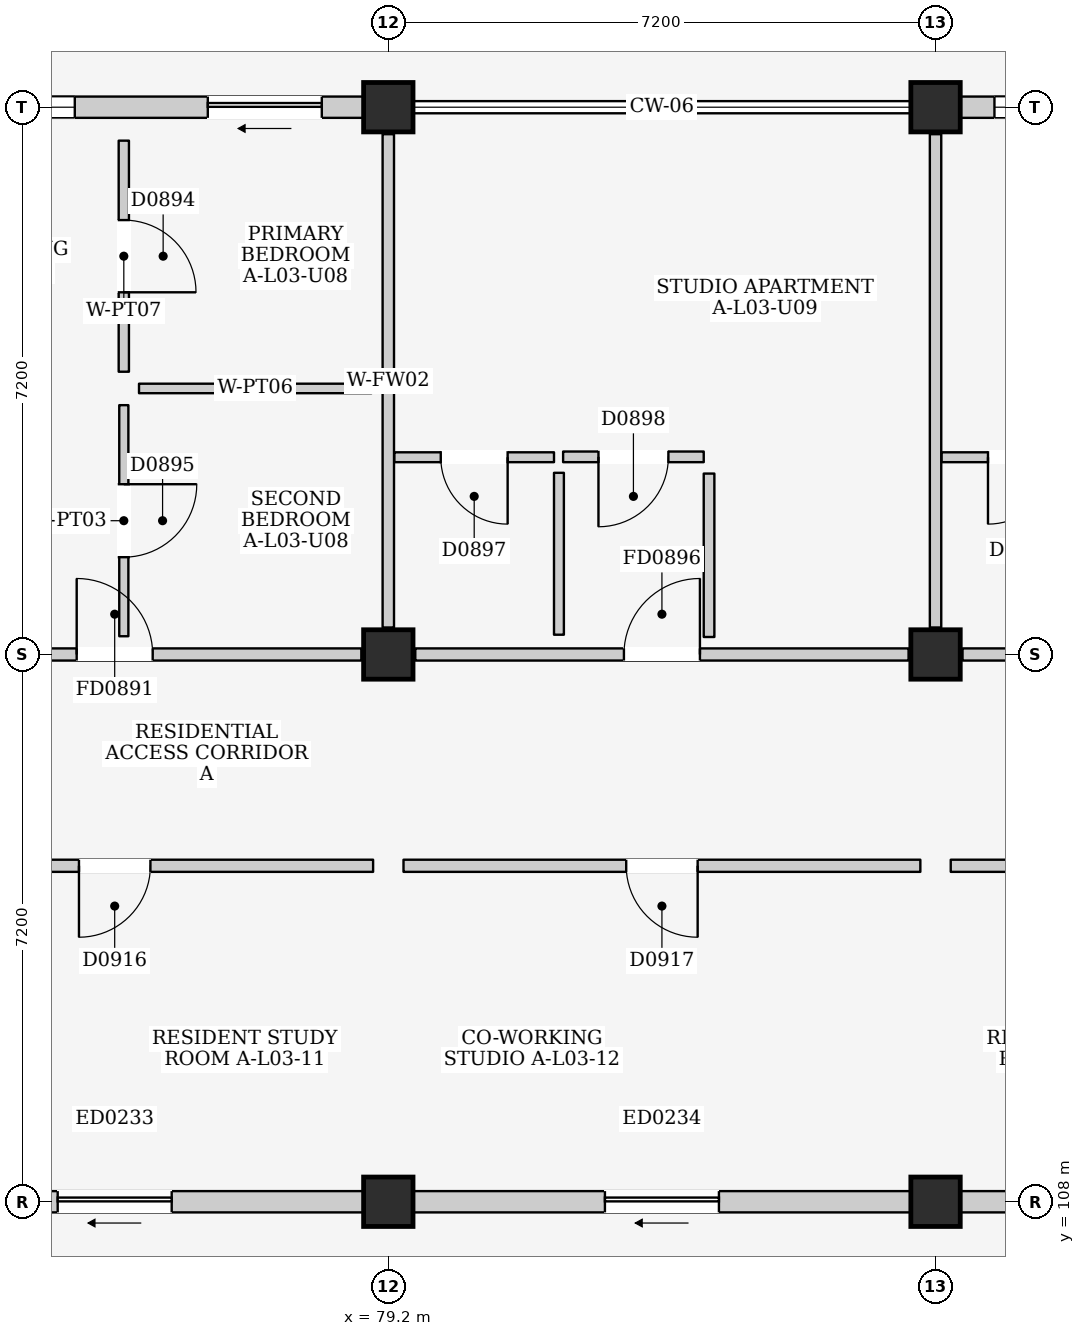
"""IFC4 building model, lengths in metres.
Left out: names, types, materials, properties, quantities, classifications, styles, units other than length and angle.
Written with IfcOpenShell. Run it as: python <this file> out.ifc"""

import sys

from ifc_helpers import new_model, si_unit, direction, frame, frame_2d, origin, origin_2d, place, context, subcontext, project, spatial, rectangle, extrude, element, fill, save


model = new_model("IFC4")
c1 = context("Model", 3, precision=1e-05, world=origin(), true_north=direction((0.0, 1.0)))
c2 = subcontext(c1, "Body", "Model", "MODEL_VIEW")
j1 = project(units=[si_unit("LENGTHUNIT", "METRE"), si_unit("PLANEANGLEUNIT", "RADIAN")], contexts=[c1])
p1 = place(None, origin())
s1 = spatial("IfcSite", under=j1, at=p1, CompositionType="ELEMENT")
p2 = place(p1, origin())
s2 = spatial("IfcBuilding", under=s1, at=p2, CompositionType="ELEMENT")
p3 = place(p2, frame((0.0, 0.0, 12.2)))
s3 = spatial("IfcBuildingStorey", under=s2, at=p3, CompositionType="ELEMENT", Elevation=12.2)
for number, where, z_axis, x_axis in (
    (1, (79.2, 108.0, 0.0), (0.0, 0.0, 1.0), (1.0, 0.0, 0.0)),
    (2, (79.2, 115.2, 0.0), (0.0, 0.0, 1.0), (1.0, 0.0, 0.0)),
    (3, (79.2, 122.4, 0.0), (0.0, 0.0, 1.0), (1.0, 0.0, 0.0)),
    (4, (86.4, 108.0, 0.0), (0.0, 0.0, 1.0), (1.0, 0.0, 0.0)),
    (5, (86.4, 115.2, 0.0), (0.0, 0.0, 1.0), (1.0, 0.0, 0.0)),
    (6, (86.4, 122.4, 0.0), (0.0, 0.0, 1.0), (1.0, 0.0, 0.0)),
):
    element("IfcColumn", number, at=place(p3, frame(where, z_axis=z_axis, x_axis=x_axis)), inside=s3, PredefinedType="COLUMN", context=c2, shape_type="SweptSolid", body=[
        extrude(rectangle(XDim=0.65, YDim=0.65, at=origin_2d()), origin(), (0.0, 0.0, 1.0), 3.2),
    ])
p4 = place(p3, frame((72.325, 122.4, 0.0), z_axis=(0.0, 0.0, 1.0), x_axis=(1.0, 0.0, 0.0)))
e7 = element("IfcWall", 7, at=p4, inside=s3, PredefinedType="ELEMENTEDWALL", context=c2, shape_type="SweptSolid", body=[
    extrude(rectangle(XDim=6.55, YDim=0.28, at=frame_2d((3.275, 0.0))), origin(), (0.0, 0.0, 1.0), 2.445),
])
p5 = place(p4, frame((4.5, 0.0, 0.0)))
e8 = element("IfcOpeningElement", 8, at=p5, cuts=e7, PredefinedType="OPENING", context=c2, shape_type="SweptSolid", body=[
    extrude(rectangle(XDim=1.5, YDim=2.12, at=frame_2d((0.75, 1.06))), frame((0.0, 0.155, 0.0), z_axis=(0.0, -1.0, 0.0), x_axis=(1.0, 0.0, 0.0)), (0.0, 0.0, 1.0), 0.31),
])
p6 = place(p4, frame((0.45, 0.0, 0.735)))
e9 = element("IfcOpeningElement", 9, at=p6, cuts=e7, PredefinedType="OPENING", context=c2, shape_type="SweptSolid", body=[
    extrude(rectangle(XDim=2.3, YDim=1.6, at=frame_2d((1.15, 0.8))), frame((0.0, 0.155, 0.0), z_axis=(0.0, -1.0, 0.0), x_axis=(1.0, 0.0, 0.0)), (0.0, 0.0, 1.0), 0.31),
])
p7 = place(p3, frame((72.325, 108.0, 0.0), z_axis=(0.0, 0.0, 1.0), x_axis=(1.0, 0.0, 0.0)))
e10 = element("IfcWall", 10, at=p7, inside=s3, PredefinedType="ELEMENTEDWALL", context=c2, shape_type="SweptSolid", body=[
    extrude(rectangle(XDim=6.55, YDim=0.28, at=frame_2d((3.275, 0.0))), origin(), (0.0, 0.0, 1.0), 2.315),
])
p8 = place(p7, frame((2.525, 0.0, 0.0)))
e11 = element("IfcOpeningElement", 11, at=p8, cuts=e10, PredefinedType="OPENING", context=c2, shape_type="SweptSolid", body=[
    extrude(rectangle(XDim=1.5, YDim=2.12, at=frame_2d((0.75, 1.06))), frame((0.0, 0.155, 0.0), z_axis=(0.0, -1.0, 0.0), x_axis=(1.0, 0.0, 0.0)), (0.0, 0.0, 1.0), 0.31),
])
p9 = place(p3, frame((79.525, 108.0, 0.0), z_axis=(0.0, 0.0, 1.0), x_axis=(1.0, 0.0, 0.0)))
e12 = element("IfcWall", 12, at=p9, inside=s3, PredefinedType="ELEMENTEDWALL", context=c2, shape_type="SweptSolid", body=[
    extrude(rectangle(XDim=6.55, YDim=0.28, at=frame_2d((3.275, 0.0))), origin(), (0.0, 0.0, 1.0), 2.315),
])
p10 = place(p9, frame((2.525, 0.0, 0.0)))
e13 = element("IfcOpeningElement", 13, at=p10, cuts=e12, PredefinedType="OPENING", context=c2, shape_type="SweptSolid", body=[
    extrude(rectangle(XDim=1.5, YDim=2.12, at=frame_2d((0.75, 1.06))), frame((0.0, 0.155, 0.0), z_axis=(0.0, -1.0, 0.0), x_axis=(1.0, 0.0, 0.0)), (0.0, 0.0, 1.0), 0.31),
])
p11 = place(p3, frame((86.725, 122.4, 0.0), z_axis=(0.0, 0.0, 1.0), x_axis=(1.0, 0.0, 0.0)))
e14 = element("IfcWall", 14, at=p11, inside=s3, PredefinedType="ELEMENTEDWALL", context=c2, shape_type="SweptSolid", body=[
    extrude(rectangle(XDim=6.55, YDim=0.28, at=frame_2d((3.275, 0.0))), origin(), (0.0, 0.0, 1.0), 2.445),
])
p12 = place(p11, frame((4.0, 0.0, 0.0)))
e15 = element("IfcOpeningElement", 15, at=p12, cuts=e14, PredefinedType="OPENING", context=c2, shape_type="SweptSolid", body=[
    extrude(rectangle(XDim=2.0, YDim=2.12, at=frame_2d((1.0, 1.06))), frame((0.0, 0.155, 0.0), z_axis=(0.0, -1.0, 0.0), x_axis=(1.0, 0.0, 0.0)), (0.0, 0.0, 1.0), 0.31),
])
p13 = place(p11, frame((0.45, 0.0, 0.9)))
e16 = element("IfcOpeningElement", 16, at=p13, cuts=e14, PredefinedType="OPENING", context=c2, shape_type="SweptSolid", body=[
    extrude(rectangle(XDim=1.85, YDim=1.4, at=frame_2d((0.925, 0.7))), frame((0.0, 0.155, 0.0), z_axis=(0.0, -1.0, 0.0), x_axis=(1.0, 0.0, 0.0)), (0.0, 0.0, 1.0), 0.31),
])
p14 = place(p3, frame((86.725, 108.0, 0.0), z_axis=(0.0, 0.0, 1.0), x_axis=(1.0, 0.0, 0.0)))
e17 = element("IfcWall", 17, at=p14, inside=s3, PredefinedType="ELEMENTEDWALL", context=c2, shape_type="SweptSolid", body=[
    extrude(rectangle(XDim=6.55, YDim=0.28, at=frame_2d((3.275, 0.0))), origin(), (0.0, 0.0, 1.0), 2.315),
])
p15 = place(p14, frame((2.525, 0.0, 0.0)))
e18 = element("IfcOpeningElement", 18, at=p15, cuts=e17, PredefinedType="OPENING", context=c2, shape_type="SweptSolid", body=[
    extrude(rectangle(XDim=1.5, YDim=2.12, at=frame_2d((0.75, 1.06))), frame((0.0, 0.155, 0.0), z_axis=(0.0, -1.0, 0.0), x_axis=(1.0, 0.0, 0.0)), (0.0, 0.0, 1.0), 0.31),
])
p16 = place(p3, frame((72.355, 115.2, 0.0), z_axis=(0.0, 0.0, 1.0), x_axis=(1.0, 0.0, 0.0)))
e19 = element("IfcWall", 19, at=p16, inside=s3, PredefinedType="PARTITIONING", context=c2, shape_type="SweptSolid", body=[
    extrude(rectangle(XDim=6.49, YDim=0.16, at=frame_2d((3.245, 0.0))), origin(), (0.0, 0.0, 1.0), 2.315),
])
p17 = place(p16, frame((2.745, 0.0, 0.0)))
e20 = element("IfcOpeningElement", 20, at=p17, cuts=e19, PredefinedType="OPENING", context=c2, shape_type="SweptSolid", body=[
    extrude(rectangle(XDim=1.0, YDim=2.15, at=frame_2d((0.5, 1.075))), frame((0.0, 0.095, 0.0), z_axis=(0.0, -1.0, 0.0), x_axis=(1.0, 0.0, 0.0)), (0.0, 0.0, 1.0), 0.19),
])
p18 = place(p3, frame((79.2, 115.555, 0.0), z_axis=(0.0, 0.0, 1.0), x_axis=(0.0, 1.0, 0.0)))
e21 = element("IfcWall", 21, at=p18, inside=s3, PredefinedType="PARTITIONING", context=c2, shape_type="SweptSolid", body=[
    extrude(rectangle(XDim=6.49, YDim=0.15, at=frame_2d((3.245, 0.0))), origin(), (0.0, 0.0, 1.0), 2.415),
])
p19 = place(p3, frame((75.72, 118.92, 0.0), z_axis=(0.0, 0.0, 1.0), x_axis=(0.0, 1.0, 0.0)))
e22 = element("IfcWall", 22, at=p19, inside=s3, PredefinedType="PARTITIONING", context=c2, shape_type="SweptSolid", body=[
    extrude(rectangle(XDim=3.04, YDim=0.135, at=frame_2d((1.52, 0.0))), origin(), (0.0, 0.0, 1.0), 2.98),
])
p20 = place(p19, frame((1.045, 0.0, 0.0)))
e23 = element("IfcOpeningElement", 23, at=p20, cuts=e22, PredefinedType="OPENING", context=c2, shape_type="SweptSolid", body=[
    extrude(rectangle(XDim=0.95, YDim=2.15, at=frame_2d((0.475, 1.075))), frame((0.0, 0.083, 0.0), z_axis=(0.0, -1.0, 0.0), x_axis=(1.0, 0.0, 0.0)), (0.0, 0.0, 1.0), 0.165),
])
p21 = place(p3, frame((75.92, 118.7, 0.0), z_axis=(0.0, 0.0, 1.0), x_axis=(1.0, 0.0, 0.0)))
e24 = element("IfcWall", 24, at=p21, inside=s3, PredefinedType="PARTITIONING", context=c2, shape_type="SweptSolid", body=[
    extrude(rectangle(XDim=3.06, YDim=0.125, at=frame_2d((1.53, 0.0))), origin(), (0.0, 0.0, 1.0), 2.98),
])
p22 = place(p3, frame((75.72, 115.44, 0.0), z_axis=(0.0, 0.0, 1.0), x_axis=(0.0, 1.0, 0.0)))
e25 = element("IfcWall", 25, at=p22, inside=s3, PredefinedType="PARTITIONING", context=c2, shape_type="SweptSolid", body=[
    extrude(rectangle(XDim=3.04, YDim=0.12, at=frame_2d((1.52, 0.0))), origin(), (0.0, 0.0, 1.0), 2.98),
])
p23 = place(p22, frame((1.04, 0.0, 0.0)))
e26 = element("IfcOpeningElement", 26, at=p23, cuts=e25, PredefinedType="OPENING", context=c2, shape_type="SweptSolid", body=[
    extrude(rectangle(XDim=0.96, YDim=2.15, at=frame_2d((0.48, 1.075))), frame((0.0, 0.075, 0.0), z_axis=(0.0, -1.0, 0.0), x_axis=(1.0, 0.0, 0.0)), (0.0, 0.0, 1.0), 0.15),
])
p24 = place(p3, frame((79.555, 115.2, 0.0), z_axis=(0.0, 0.0, 1.0), x_axis=(1.0, 0.0, 0.0)))
e27 = element("IfcWall", 27, at=p24, inside=s3, PredefinedType="PARTITIONING", context=c2, shape_type="SweptSolid", body=[
    extrude(rectangle(XDim=6.49, YDim=0.16, at=frame_2d((3.245, 0.0))), origin(), (0.0, 0.0, 1.0), 2.315),
])
p25 = place(p24, frame((2.745, 0.0, 0.0)))
e28 = element("IfcOpeningElement", 28, at=p25, cuts=e27, PredefinedType="OPENING", context=c2, shape_type="SweptSolid", body=[
    extrude(rectangle(XDim=1.0, YDim=2.15, at=frame_2d((0.5, 1.075))), frame((0.0, 0.095, 0.0), z_axis=(0.0, -1.0, 0.0), x_axis=(1.0, 0.0, 0.0)), (0.0, 0.0, 1.0), 0.19),
])
p26 = place(p3, frame((86.4, 115.555, 0.0), z_axis=(0.0, 0.0, 1.0), x_axis=(0.0, 1.0, 0.0)))
e29 = element("IfcWall", 29, at=p26, inside=s3, PredefinedType="PARTITIONING", context=c2, shape_type="SweptSolid", body=[
    extrude(rectangle(XDim=6.49, YDim=0.15, at=frame_2d((3.245, 0.0))), origin(), (0.0, 0.0, 1.0), 2.415),
])
p27 = place(p3, frame((79.28, 117.795, 0.0), z_axis=(0.0, 0.0, 1.0), x_axis=(1.0, 0.0, 0.0)))
e30 = element("IfcWall", 30, at=p27, inside=s3, PredefinedType="PARTITIONING", context=c2, shape_type="SweptSolid", body=[
    extrude(rectangle(XDim=2.1, YDim=0.13, at=frame_2d((1.05, 0.0))), origin(), (0.0, 0.0, 1.0), 2.98),
])
p28 = place(p27, frame((0.61, 0.0, 0.0)))
e31 = element("IfcOpeningElement", 31, at=p28, cuts=e30, PredefinedType="OPENING", context=c2, shape_type="SweptSolid", body=[
    extrude(rectangle(XDim=0.88, YDim=2.1, at=frame_2d((0.44, 1.05))), frame((0.0, 0.08, 0.0), z_axis=(0.0, -1.0, 0.0), x_axis=(1.0, 0.0, 0.0)), (0.0, 0.0, 1.0), 0.16),
])
p29 = place(p3, frame((81.445, 115.46, 0.0), z_axis=(0.0, 0.0, 1.0), x_axis=(0.0, 1.0, 0.0)))
e32 = element("IfcWall", 32, at=p29, inside=s3, PredefinedType="PARTITIONING", context=c2, shape_type="SweptSolid", body=[
    extrude(rectangle(XDim=2.13, YDim=0.13, at=frame_2d((1.065, 0.0))), origin(), (0.0, 0.0, 1.0), 2.98),
])
p30 = place(p3, frame((81.5, 117.8, 0.0), z_axis=(0.0, 0.0, 1.0), x_axis=(1.0, 0.0, 0.0)))
e33 = element("IfcWall", 33, at=p30, inside=s3, PredefinedType="PARTITIONING", context=c2, shape_type="SweptSolid", body=[
    extrude(rectangle(XDim=1.85, YDim=0.14, at=frame_2d((0.925, 0.0))), origin(), (0.0, 0.0, 1.0), 2.98),
])
p31 = place(p30, frame((0.465, 0.0, 0.0)))
e34 = element("IfcOpeningElement", 34, at=p31, cuts=e33, PredefinedType="OPENING", context=c2, shape_type="SweptSolid", body=[
    extrude(rectangle(XDim=0.92, YDim=2.1, at=frame_2d((0.46, 1.05))), frame((0.0, 0.085, 0.0), z_axis=(0.0, -1.0, 0.0), x_axis=(1.0, 0.0, 0.0)), (0.0, 0.0, 1.0), 0.17),
])
p32 = place(p3, frame((83.42, 115.43, 0.0), z_axis=(0.0, 0.0, 1.0), x_axis=(0.0, 1.0, 0.0)))
e35 = element("IfcWall", 35, at=p32, inside=s3, PredefinedType="PARTITIONING", context=c2, shape_type="SweptSolid", body=[
    extrude(rectangle(XDim=2.15, YDim=0.14, at=frame_2d((1.075, 0.0))), origin(), (0.0, 0.0, 1.0), 2.98),
])
p33 = place(p3, frame((86.755, 115.2, 0.0), z_axis=(0.0, 0.0, 1.0), x_axis=(1.0, 0.0, 0.0)))
e36 = element("IfcWall", 36, at=p33, inside=s3, PredefinedType="PARTITIONING", context=c2, shape_type="SweptSolid", body=[
    extrude(rectangle(XDim=6.49, YDim=0.16, at=frame_2d((3.245, 0.0))), origin(), (0.0, 0.0, 1.0), 2.315),
])
p34 = place(p33, frame((2.745, 0.0, 0.0)))
e37 = element("IfcOpeningElement", 37, at=p34, cuts=e36, PredefinedType="OPENING", context=c2, shape_type="SweptSolid", body=[
    extrude(rectangle(XDim=1.0, YDim=2.15, at=frame_2d((0.5, 1.075))), frame((0.0, 0.095, 0.0), z_axis=(0.0, -1.0, 0.0), x_axis=(1.0, 0.0, 0.0)), (0.0, 0.0, 1.0), 0.19),
])
p35 = place(p3, frame((86.48, 117.795, 0.0), z_axis=(0.0, 0.0, 1.0), x_axis=(1.0, 0.0, 0.0)))
e38 = element("IfcWall", 38, at=p35, inside=s3, PredefinedType="PARTITIONING", context=c2, shape_type="SweptSolid", body=[
    extrude(rectangle(XDim=2.1, YDim=0.13, at=frame_2d((1.05, 0.0))), origin(), (0.0, 0.0, 1.0), 2.98),
])
p36 = place(p35, frame((0.61, 0.0, 0.0)))
e39 = element("IfcOpeningElement", 39, at=p36, cuts=e38, PredefinedType="OPENING", context=c2, shape_type="SweptSolid", body=[
    extrude(rectangle(XDim=0.88, YDim=2.1, at=frame_2d((0.44, 1.05))), frame((0.0, 0.08, 0.0), z_axis=(0.0, -1.0, 0.0), x_axis=(1.0, 0.0, 0.0)), (0.0, 0.0, 1.0), 0.16),
])
p37 = place(p3, frame((72.2, 112.42, 0.0), z_axis=(0.0, 0.0, 1.0), x_axis=(1.0, 0.0, 0.0)))
e40 = element("IfcWall", 40, at=p37, inside=s3, PredefinedType="PARTITIONING", context=c2, shape_type="SweptSolid", body=[
    extrude(rectangle(XDim=6.8, YDim=0.16, at=frame_2d((3.4, 0.0))), origin(), (0.0, 0.0, 1.0), 2.98),
])
p38 = place(p37, frame((2.93, 0.0, 0.0)))
e41 = element("IfcOpeningElement", 41, at=p38, cuts=e40, PredefinedType="OPENING", context=c2, shape_type="SweptSolid", body=[
    extrude(rectangle(XDim=0.94, YDim=2.12, at=frame_2d((0.47, 1.06))), frame((0.0, 0.095, 0.0), z_axis=(0.0, -1.0, 0.0), x_axis=(1.0, 0.0, 0.0)), (0.0, 0.0, 1.0), 0.19),
])
p39 = place(p3, frame((79.4, 112.42, 0.0), z_axis=(0.0, 0.0, 1.0), x_axis=(1.0, 0.0, 0.0)))
e42 = element("IfcWall", 42, at=p39, inside=s3, PredefinedType="PARTITIONING", context=c2, shape_type="SweptSolid", body=[
    extrude(rectangle(XDim=6.8, YDim=0.16, at=frame_2d((3.4, 0.0))), origin(), (0.0, 0.0, 1.0), 2.98),
])
p40 = place(p39, frame((2.93, 0.0, 0.0)))
e43 = element("IfcOpeningElement", 43, at=p40, cuts=e42, PredefinedType="OPENING", context=c2, shape_type="SweptSolid", body=[
    extrude(rectangle(XDim=0.94, YDim=2.12, at=frame_2d((0.47, 1.06))), frame((0.0, 0.095, 0.0), z_axis=(0.0, -1.0, 0.0), x_axis=(1.0, 0.0, 0.0)), (0.0, 0.0, 1.0), 0.19),
])
p41 = place(p3, frame((86.6, 112.42, 0.0), z_axis=(0.0, 0.0, 1.0), x_axis=(1.0, 0.0, 0.0)))
e44 = element("IfcWall", 44, at=p41, inside=s3, PredefinedType="PARTITIONING", context=c2, shape_type="SweptSolid", body=[
    extrude(rectangle(XDim=6.8, YDim=0.16, at=frame_2d((3.4, 0.0))), origin(), (0.0, 0.0, 1.0), 2.98),
])
p42 = place(p41, frame((2.93, 0.0, 0.0)))
e45 = element("IfcOpeningElement", 45, at=p42, cuts=e44, PredefinedType="OPENING", context=c2, shape_type="SweptSolid", body=[
    extrude(rectangle(XDim=0.94, YDim=2.12, at=frame_2d((0.47, 1.06))), frame((0.0, 0.095, 0.0), z_axis=(0.0, -1.0, 0.0), x_axis=(1.0, 0.0, 0.0)), (0.0, 0.0, 1.0), 0.19),
])
p43 = place(p5, frame((1.5, 0.0, 0.0), z_axis=(0.0, 0.0, 1.0), x_axis=(-1.0, 0.0, 0.0)))
e46 = element("IfcDoor", 46, at=p43, inside=s3, OperationType="SLIDING_TO_LEFT", PredefinedType="DOOR", context=c2, shape_type="SweptSolid", body=[
    extrude(rectangle(XDim=1.5, YDim=2.12, at=frame_2d((0.75, 1.06))), frame((0.0, 0.025, 0.0), z_axis=(0.0, -1.0, 0.0), x_axis=(1.0, 0.0, 0.0)), (0.0, 0.0, 1.0), 0.05),
])
fill(e8, e46)
p44 = place(p6, origin())
e47 = element("IfcWindow", 47, at=p44, inside=s3, PartitioningType="TRIPLE_PANEL_VERTICAL", PredefinedType="WINDOW", context=c2, shape_type="SweptSolid", body=[
    extrude(rectangle(XDim=2.3, YDim=1.6, at=frame_2d((1.15, 0.8))), frame((0.0, 0.03, 0.0), z_axis=(0.0, -1.0, 0.0), x_axis=(1.0, 0.0, 0.0)), (0.0, 0.0, 1.0), 0.06),
])
fill(e9, e47)
p45 = place(p8, frame((1.5, 0.0, 0.0), z_axis=(0.0, 0.0, 1.0), x_axis=(-1.0, 0.0, 0.0)))
e48 = element("IfcDoor", 48, at=p45, inside=s3, OperationType="SLIDING_TO_LEFT", PredefinedType="DOOR", context=c2, shape_type="SweptSolid", body=[
    extrude(rectangle(XDim=1.5, YDim=2.12, at=frame_2d((0.75, 1.06))), frame((0.0, 0.025, 0.0), z_axis=(0.0, -1.0, 0.0), x_axis=(1.0, 0.0, 0.0)), (0.0, 0.0, 1.0), 0.05),
])
fill(e11, e48)
p46 = place(p10, frame((1.5, 0.0, 0.0), z_axis=(0.0, 0.0, 1.0), x_axis=(-1.0, 0.0, 0.0)))
e49 = element("IfcDoor", 49, at=p46, inside=s3, OperationType="SLIDING_TO_LEFT", PredefinedType="DOOR", context=c2, shape_type="SweptSolid", body=[
    extrude(rectangle(XDim=1.5, YDim=2.12, at=frame_2d((0.75, 1.06))), frame((0.0, 0.025, 0.0), z_axis=(0.0, -1.0, 0.0), x_axis=(1.0, 0.0, 0.0)), (0.0, 0.0, 1.0), 0.05),
])
fill(e13, e49)
p47 = place(p13, origin())
e50 = element("IfcWindow", 50, at=p47, inside=s3, PartitioningType="DOUBLE_PANEL_VERTICAL", PredefinedType="WINDOW", context=c2, shape_type="SweptSolid", body=[
    extrude(rectangle(XDim=1.85, YDim=1.4, at=frame_2d((0.925, 0.7))), frame((0.0, 0.03, 0.0), z_axis=(0.0, -1.0, 0.0), x_axis=(1.0, 0.0, 0.0)), (0.0, 0.0, 1.0), 0.06),
])
fill(e16, e50)
p48 = place(p17, origin())
e51 = element("IfcDoor", 51, at=p48, inside=s3, OperationType="SINGLE_SWING_LEFT", PredefinedType="DOOR", context=c2, shape_type="SweptSolid", body=[
    extrude(rectangle(XDim=1.0, YDim=2.15, at=frame_2d((0.5, 1.075))), frame((0.0, 0.025, 0.0), z_axis=(0.0, -1.0, 0.0), x_axis=(1.0, 0.0, 0.0)), (0.0, 0.0, 1.0), 0.05),
])
fill(e20, e51)
p49 = place(p20, frame((0.95, 0.0, 0.0), z_axis=(0.0, 0.0, 1.0), x_axis=(-1.0, 0.0, 0.0)))
e52 = element("IfcDoor", 52, at=p49, inside=s3, OperationType="SINGLE_SWING_RIGHT", PredefinedType="DOOR", context=c2, shape_type="SweptSolid", body=[
    extrude(rectangle(XDim=0.95, YDim=2.15, at=frame_2d((0.475, 1.075))), frame((0.0, 0.025, 0.0), z_axis=(0.0, -1.0, 0.0), x_axis=(1.0, 0.0, 0.0)), (0.0, 0.0, 1.0), 0.05),
])
fill(e23, e52)
p50 = place(p23, frame((0.96, 0.0, 0.0), z_axis=(0.0, 0.0, 1.0), x_axis=(-1.0, 0.0, 0.0)))
e53 = element("IfcDoor", 53, at=p50, inside=s3, OperationType="SINGLE_SWING_LEFT", PredefinedType="DOOR", context=c2, shape_type="SweptSolid", body=[
    extrude(rectangle(XDim=0.96, YDim=2.15, at=frame_2d((0.48, 1.075))), frame((0.0, 0.025, 0.0), z_axis=(0.0, -1.0, 0.0), x_axis=(1.0, 0.0, 0.0)), (0.0, 0.0, 1.0), 0.05),
])
fill(e26, e53)
p51 = place(p25, origin())
e54 = element("IfcDoor", 54, at=p51, inside=s3, OperationType="SINGLE_SWING_RIGHT", PredefinedType="DOOR", context=c2, shape_type="SweptSolid", body=[
    extrude(rectangle(XDim=1.0, YDim=2.15, at=frame_2d((0.5, 1.075))), frame((0.0, 0.025, 0.0), z_axis=(0.0, -1.0, 0.0), x_axis=(1.0, 0.0, 0.0)), (0.0, 0.0, 1.0), 0.05),
])
fill(e28, e54)
p52 = place(p28, frame((0.88, 0.0, 0.0), z_axis=(0.0, 0.0, 1.0), x_axis=(-1.0, 0.0, 0.0)))
e55 = element("IfcDoor", 55, at=p52, inside=s3, OperationType="SINGLE_SWING_LEFT", PredefinedType="DOOR", context=c2, shape_type="SweptSolid", body=[
    extrude(rectangle(XDim=0.88, YDim=2.1, at=frame_2d((0.44, 1.05))), frame((0.0, 0.025, 0.0), z_axis=(0.0, -1.0, 0.0), x_axis=(1.0, 0.0, 0.0)), (0.0, 0.0, 1.0), 0.05),
])
fill(e31, e55)
p53 = place(p31, frame((0.92, 0.0, 0.0), z_axis=(0.0, 0.0, 1.0), x_axis=(-1.0, 0.0, 0.0)))
e56 = element("IfcDoor", 56, at=p53, inside=s3, OperationType="SINGLE_SWING_RIGHT", PredefinedType="DOOR", context=c2, shape_type="SweptSolid", body=[
    extrude(rectangle(XDim=0.92, YDim=2.1, at=frame_2d((0.46, 1.05))), frame((0.0, 0.025, 0.0), z_axis=(0.0, -1.0, 0.0), x_axis=(1.0, 0.0, 0.0)), (0.0, 0.0, 1.0), 0.05),
])
fill(e34, e56)
p54 = place(p36, frame((0.88, 0.0, 0.0), z_axis=(0.0, 0.0, 1.0), x_axis=(-1.0, 0.0, 0.0)))
e57 = element("IfcDoor", 57, at=p54, inside=s3, OperationType="SINGLE_SWING_RIGHT", PredefinedType="DOOR", context=c2, shape_type="SweptSolid", body=[
    extrude(rectangle(XDim=0.88, YDim=2.1, at=frame_2d((0.44, 1.05))), frame((0.0, 0.025, 0.0), z_axis=(0.0, -1.0, 0.0), x_axis=(1.0, 0.0, 0.0)), (0.0, 0.0, 1.0), 0.05),
])
fill(e39, e57)
p55 = place(p38, frame((0.94, 0.0, 0.0), z_axis=(0.0, 0.0, 1.0), x_axis=(-1.0, 0.0, 0.0)))
e58 = element("IfcDoor", 58, at=p55, inside=s3, OperationType="SINGLE_SWING_RIGHT", PredefinedType="DOOR", context=c2, shape_type="SweptSolid", body=[
    extrude(rectangle(XDim=0.94, YDim=2.12, at=frame_2d((0.47, 1.06))), frame((0.0, 0.025, 0.0), z_axis=(0.0, -1.0, 0.0), x_axis=(1.0, 0.0, 0.0)), (0.0, 0.0, 1.0), 0.05),
])
fill(e41, e58)
p56 = place(p40, frame((0.94, 0.0, 0.0), z_axis=(0.0, 0.0, 1.0), x_axis=(-1.0, 0.0, 0.0)))
e59 = element("IfcDoor", 59, at=p56, inside=s3, OperationType="SINGLE_SWING_LEFT", PredefinedType="DOOR", context=c2, shape_type="SweptSolid", body=[
    extrude(rectangle(XDim=0.94, YDim=2.12, at=frame_2d((0.47, 1.06))), frame((0.0, 0.025, 0.0), z_axis=(0.0, -1.0, 0.0), x_axis=(1.0, 0.0, 0.0)), (0.0, 0.0, 1.0), 0.05),
])
fill(e43, e59)
save(model, sys.argv[1])
